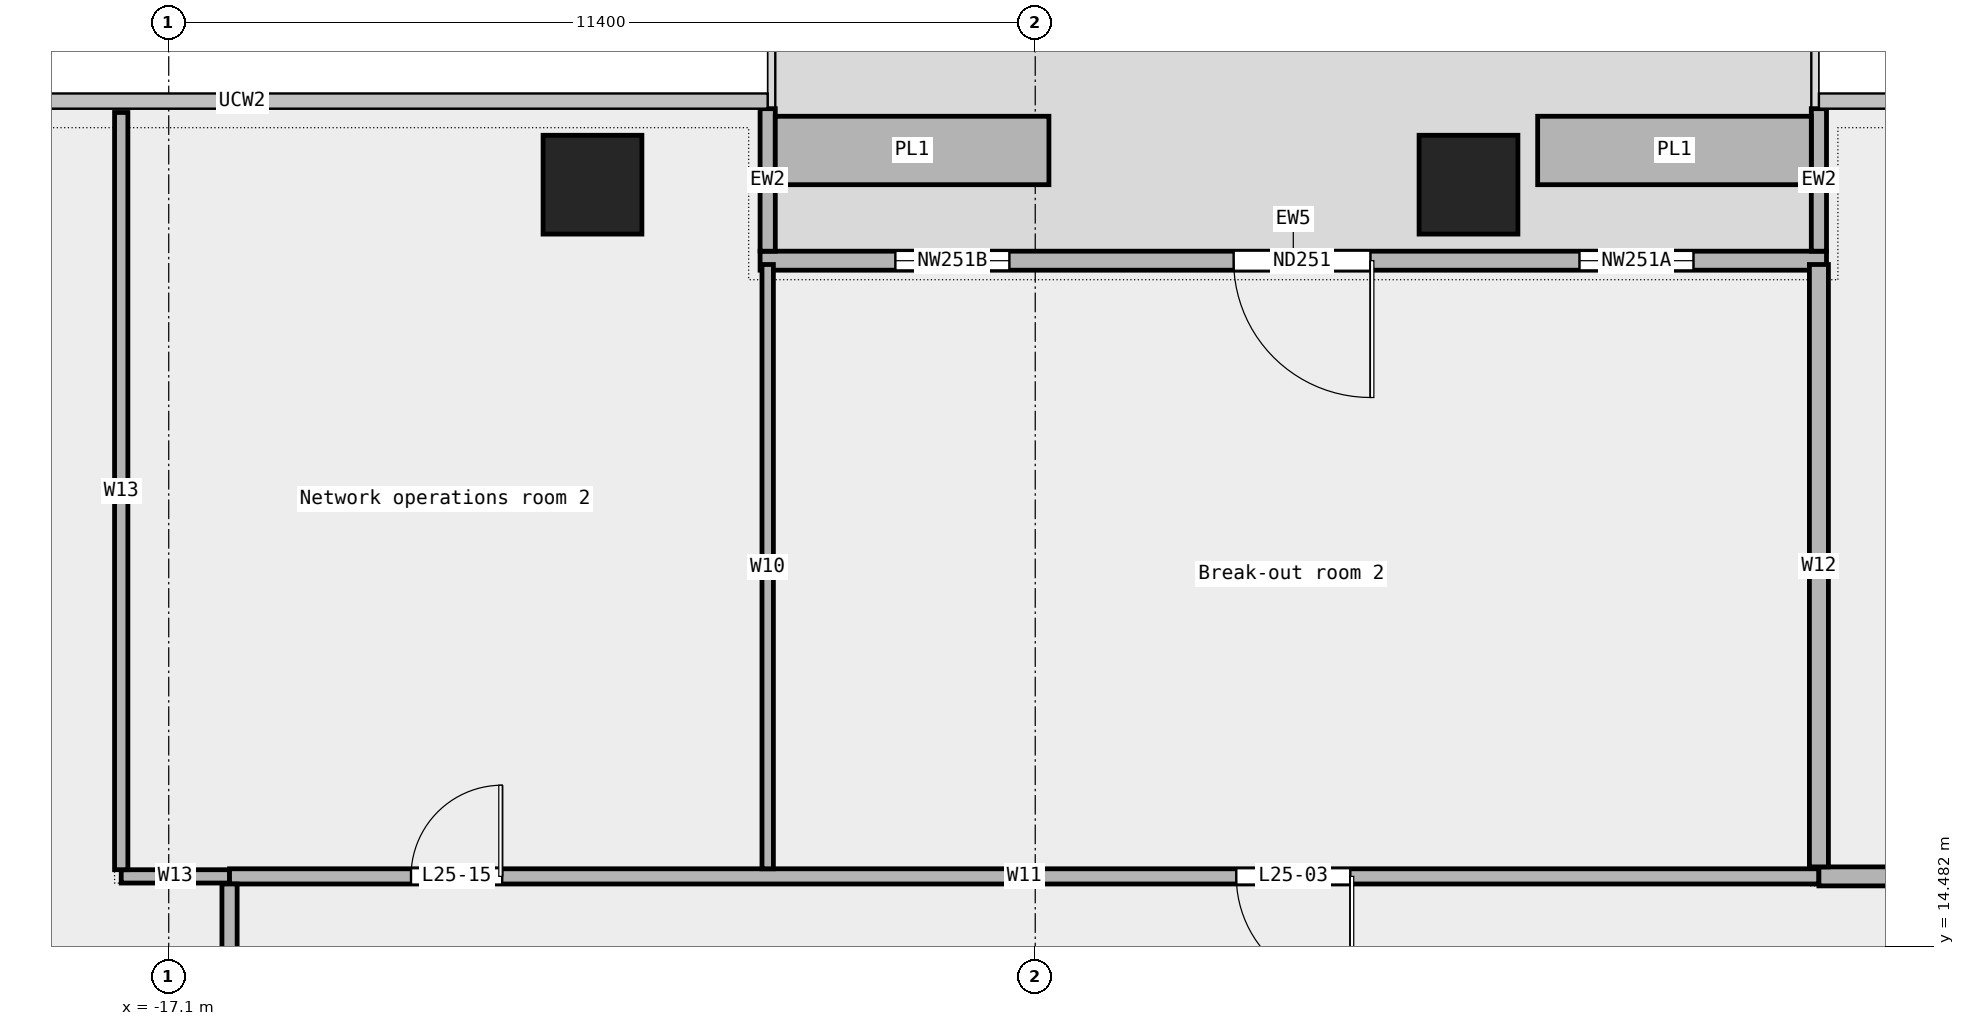
"""IFC4 building model, lengths in metres.
Left out: names, types, materials, properties, quantities, classifications, styles, units other than length and angle.
Written with IfcOpenShell. Run it as: python <this file> out.ifc"""

import sys

from ifc_helpers import new_model, si_unit, direction, frame, frame_2d, origin, origin_2d, place, context, subcontext, project, spatial, rectangle, extrude, element, fill, save


model = new_model("IFC4")
c1 = context("Model", 3, precision=1e-05, world=origin(), true_north=direction((0.0, 1.0)))
c2 = subcontext(c1, "Body", "Model", "MODEL_VIEW")
j1 = project(units=[si_unit("LENGTHUNIT", "METRE"), si_unit("PLANEANGLEUNIT", "RADIAN")], contexts=[c1])
p1 = place(None, origin())
s1 = spatial("IfcSite", under=j1, at=p1, CompositionType="ELEMENT")
p2 = place(p1, origin())
s2 = spatial("IfcBuilding", under=s1, at=p2, CompositionType="ELEMENT")
p3 = place(p2, frame((0.0, 0.0, 126.1)))
s3 = spatial("IfcBuildingStorey", under=s2, at=p3, CompositionType="ELEMENT", Elevation=126.1)
for number, where, z_axis, x_axis in (
    (1, (0.0, 24.5, 0.0), (0.0, 0.0, 1.0), (1.0, 0.0, 0.0)),
    (2, (-11.525, 24.5, 0.0), (0.0, 0.0, 1.0), (1.0, 0.0, 0.0)),
):
    element("IfcColumn", number, at=place(p3, frame(where, z_axis=z_axis, x_axis=x_axis)), inside=s3, PredefinedType="COLUMN", context=c2, shape_type="SweptSolid", body=[
        extrude(rectangle(XDim=1.3, YDim=1.3, at=origin_2d()), origin(), (0.0, 0.0, 1.0), 4.05),
    ])
p4 = place(p3, frame((4.71, 23.5, 0.0), z_axis=(0.0, 0.0, 1.0), x_axis=(-1.0, 0.0, 0.0)))
e3 = element("IfcWall", 3, at=p4, inside=s3, PredefinedType="STANDARD", context=c2, shape_type="SweptSolid", body=[
    extrude(rectangle(XDim=14.03, YDim=0.25, at=frame_2d((7.015, 0.0))), origin(), (0.0, 0.0, 1.0), 4.05),
])
p5 = place(p4, frame((1.75, 0.0, 0.45)))
e4 = element("IfcOpeningElement", 4, at=p5, cuts=e3, PredefinedType="OPENING", context=c2, shape_type="SweptSolid", body=[
    extrude(rectangle(XDim=1.5, YDim=3.0, at=frame_2d((0.75, 1.5))), frame((0.0, 0.137, 0.0), z_axis=(0.0, -1.0, 0.0), x_axis=(1.0, 0.0, 0.0)), (0.0, 0.0, 1.0), 0.274),
])
p6 = place(p4, frame((6.0, 0.0, 0.0)))
e5 = element("IfcOpeningElement", 5, at=p6, cuts=e3, PredefinedType="OPENING", context=c2, shape_type="SweptSolid", body=[
    extrude(rectangle(XDim=1.8, YDim=2.4, at=frame_2d((0.9, 1.2))), frame((0.0, 0.137, 0.0), z_axis=(0.0, -1.0, 0.0), x_axis=(1.0, 0.0, 0.0)), (0.0, 0.0, 1.0), 0.274),
])
p7 = place(p4, frame((10.75, 0.0, 0.45)))
e6 = element("IfcOpeningElement", 6, at=p7, cuts=e3, PredefinedType="OPENING", context=c2, shape_type="SweptSolid", body=[
    extrude(rectangle(XDim=1.5, YDim=3.0, at=frame_2d((0.75, 1.5))), frame((0.0, 0.137, 0.0), z_axis=(0.0, -1.0, 0.0), x_axis=(1.0, 0.0, 0.0)), (0.0, 0.0, 1.0), 0.274),
])
for number, where, z_axis, x_axis in (
    (7, (4.61, 25.5, 0.0), (0.0, 0.0, 1.0), (0.0, -1.0, 0.0)),
    (8, (-9.22, 25.5, 0.0), (0.0, 0.0, 1.0), (0.0, -1.0, 0.0)),
):
    element("IfcWall", number, at=place(p3, frame(where, z_axis=z_axis, x_axis=x_axis)), inside=s3, PredefinedType="STANDARD", context=c2, shape_type="SweptSolid", body=[
        extrude(rectangle(XDim=1.875, YDim=0.2, at=frame_2d((0.938, 0.0))), origin(), (0.0, 0.0, 1.0), 4.05),
    ])
for number, where, z_axis, x_axis in (
    (9, (4.51, 24.95, 0.0), (0.0, 0.0, 1.0), (-1.0, 0.0, 0.0)),
    (10, (-5.52, 24.95, 0.0), (0.0, 0.0, 1.0), (-1.0, 0.0, 0.0)),
):
    element("IfcWall", number, at=place(p3, frame(where, z_axis=z_axis, x_axis=x_axis)), inside=s3, PredefinedType="STANDARD", context=c2, shape_type="SweptSolid", body=[
        extrude(rectangle(XDim=3.6, YDim=0.9, at=frame_2d((1.8, 0.0))), origin(), (0.0, 0.0, 1.0), 0.7),
    ])
p8 = place(p3, frame((-17.725, 15.4, 0.0), z_axis=(0.0, 0.0, 1.0), x_axis=(1.0, 0.0, 0.0)))
e11 = element("IfcWall", 11, at=p8, inside=s3, PredefinedType="PARTITIONING", context=c2, shape_type="SweptSolid", body=[
    extrude(rectangle(XDim=1.425, YDim=0.175, at=frame_2d((0.712, 0.0))), origin(), (0.0, 0.0, 1.0), 4.05),
])
p9 = place(p3, frame((-16.3, 15.4, 0.0), z_axis=(0.0, 0.0, 1.0), x_axis=(1.0, 0.0, 0.0)))
e12 = element("IfcWall", 12, at=p9, inside=s3, PredefinedType="PARTITIONING", context=c2, shape_type="SweptSolid", body=[
    extrude(rectangle(XDim=20.91, YDim=0.2, at=frame_2d((10.455, 0.0))), origin(), (0.0, 0.0, 1.0), 4.05),
])
p10 = place(p9, frame((13.245, 0.0, 0.0)))
e13 = element("IfcOpeningElement", 13, at=p10, cuts=e12, PredefinedType="OPENING", context=c2, shape_type="SweptSolid", body=[
    extrude(rectangle(XDim=1.5, YDim=2.1, at=frame_2d((0.75, 1.05))), frame((0.0, 0.112, 0.0), z_axis=(0.0, -1.0, 0.0), x_axis=(1.0, 0.0, 0.0)), (0.0, 0.0, 1.0), 0.224),
])
p11 = place(p9, frame((2.387, 0.0, 0.0)))
e14 = element("IfcOpeningElement", 14, at=p11, cuts=e12, PredefinedType="OPENING", context=c2, shape_type="SweptSolid", body=[
    extrude(rectangle(XDim=1.2, YDim=2.1, at=frame_2d((0.6, 1.05))), frame((0.0, 0.112, 0.0), z_axis=(0.0, -1.0, 0.0), x_axis=(1.0, 0.0, 0.0)), (0.0, 0.0, 1.0), 0.224),
])
p12 = place(p3, frame((4.61, 15.4, 0.0), z_axis=(0.0, 0.0, 1.0), x_axis=(1.0, 0.0, 0.0)))
e15 = element("IfcWall", 15, at=p12, inside=s3, PredefinedType="PARTITIONING", context=c2, shape_type="SweptSolid", body=[
    extrude(rectangle(XDim=4.25, YDim=0.25, at=frame_2d((2.125, 0.0))), origin(), (0.0, 0.0, 1.0), 4.05),
])
p13 = place(p12, frame((1.675, 0.0, 0.0)))
e16 = element("IfcOpeningElement", 16, at=p13, cuts=e15, PredefinedType="OPENING", context=c2, shape_type="SweptSolid", body=[
    extrude(rectangle(XDim=0.9, YDim=2.1, at=frame_2d((0.45, 1.05))), frame((0.0, 0.137, 0.0), z_axis=(0.0, -1.0, 0.0), x_axis=(1.0, 0.0, 0.0)), (0.0, 0.0, 1.0), 0.274),
])
p14 = place(p3, frame((-17.725, 15.488, 0.0), z_axis=(0.0, 0.0, 1.0), x_axis=(0.0, 1.0, 0.0)))
e17 = element("IfcWall", 17, at=p14, inside=s3, PredefinedType="PARTITIONING", context=c2, shape_type="SweptSolid", body=[
    extrude(rectangle(XDim=9.962, YDim=0.175, at=frame_2d((4.981, 0.0))), origin(), (0.0, 0.0, 1.0), 4.05),
])
p15 = place(p3, frame((-16.3, 11.75, 0.0), z_axis=(0.0, 0.0, 1.0), x_axis=(0.0, 1.0, 0.0)))
e18 = element("IfcWall", 18, at=p15, inside=s3, PredefinedType="PARTITIONING", context=c2, shape_type="SweptSolid", body=[
    extrude(rectangle(XDim=3.55, YDim=0.2, at=frame_2d((1.775, 0.0))), origin(), (0.0, 0.0, 1.0), 4.05),
])
p16 = place(p3, frame((-9.22, 15.5, 0.0), z_axis=(0.0, 0.0, 1.0), x_axis=(0.0, 1.0, 0.0)))
e19 = element("IfcWall", 19, at=p16, inside=s3, PredefinedType="PARTITIONING", context=c2, shape_type="SweptSolid", body=[
    extrude(rectangle(XDim=7.95, YDim=0.15, at=frame_2d((3.975, 0.0))), origin(), (0.0, 0.0, 1.0), 4.05),
])
p17 = place(p3, frame((4.61, 15.525, 0.0), z_axis=(0.0, 0.0, 1.0), x_axis=(0.0, 1.0, 0.0)))
e20 = element("IfcWall", 20, at=p17, inside=s3, PredefinedType="PARTITIONING", context=c2, shape_type="SweptSolid", body=[
    extrude(rectangle(XDim=7.925, YDim=0.25, at=frame_2d((3.962, 0.0))), origin(), (0.0, 0.0, 1.0), 4.05),
])
p18 = place(p5, origin())
e21 = element("IfcWindow", 21, at=p18, inside=s3, PartitioningType="SINGLE_PANEL", PredefinedType="WINDOW", context=c2, shape_type="SweptSolid", body=[
    extrude(rectangle(XDim=1.5, YDim=3.0, at=frame_2d((0.75, 1.5))), frame((0.0, 0.03, 0.0), z_axis=(0.0, -1.0, 0.0), x_axis=(1.0, 0.0, 0.0)), (0.0, 0.0, 1.0), 0.06),
])
fill(e4, e21)
p19 = place(p6, origin())
e22 = element("IfcDoor", 22, at=p19, inside=s3, OperationType="DOUBLE_DOOR_SINGLE_SWING", PredefinedType="DOOR", context=c2, shape_type="SweptSolid", body=[
    extrude(rectangle(XDim=1.8, YDim=2.4, at=frame_2d((0.9, 1.2))), frame((0.0, 0.025, 0.0), z_axis=(0.0, -1.0, 0.0), x_axis=(1.0, 0.0, 0.0)), (0.0, 0.0, 1.0), 0.05),
])
fill(e5, e22)
p20 = place(p7, origin())
e23 = element("IfcWindow", 23, at=p20, inside=s3, PartitioningType="SINGLE_PANEL", PredefinedType="WINDOW", context=c2, shape_type="SweptSolid", body=[
    extrude(rectangle(XDim=1.5, YDim=3.0, at=frame_2d((0.75, 1.5))), frame((0.0, 0.03, 0.0), z_axis=(0.0, -1.0, 0.0), x_axis=(1.0, 0.0, 0.0)), (0.0, 0.0, 1.0), 0.06),
])
fill(e6, e23)
p21 = place(p10, origin())
e24 = element("IfcDoor", 24, at=p21, inside=s3, OperationType="DOUBLE_DOOR_SINGLE_SWING", PredefinedType="DOOR", context=c2, shape_type="SweptSolid", body=[
    extrude(rectangle(XDim=1.5, YDim=2.1, at=frame_2d((0.75, 1.05))), frame((0.0, 0.025, 0.0), z_axis=(0.0, -1.0, 0.0), x_axis=(1.0, 0.0, 0.0)), (0.0, 0.0, 1.0), 0.05),
])
fill(e13, e24)
p22 = place(p11, origin())
e25 = element("IfcDoor", 25, at=p22, inside=s3, OperationType="SINGLE_SWING_RIGHT", PredefinedType="DOOR", context=c2, shape_type="SweptSolid", body=[
    extrude(rectangle(XDim=1.2, YDim=2.1, at=frame_2d((0.6, 1.05))), frame((0.0, 0.025, 0.0), z_axis=(0.0, -1.0, 0.0), x_axis=(1.0, 0.0, 0.0)), (0.0, 0.0, 1.0), 0.05),
])
fill(e14, e25)
save(model, sys.argv[1])
